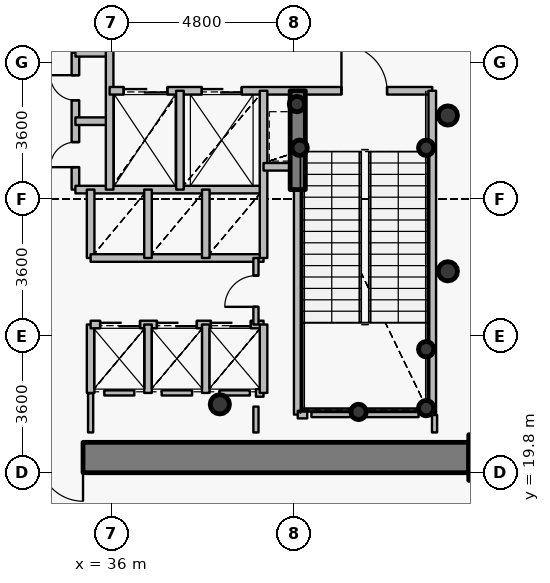
"""IFC4 building model, lengths in metres.
Left out: names, types, materials, properties, quantities, classifications, styles, units other than length and angle.
Written with IfcOpenShell. Run it as: python <this file> out.ifc"""

import sys

from ifc_helpers import new_model, si_unit, direction, frame, frame_2d, origin, origin_2d, place, context, subcontext, project, spatial, rectangle, hollow_circle, extrude, source, transform, mapped, element, fill, save


model = new_model("IFC4")
c1 = context("Model", 3, precision=1e-05, world=origin(), true_north=direction((0.0, 1.0)))
c2 = subcontext(c1, "Body", "Model", "MODEL_VIEW")
j1 = project(units=[si_unit("LENGTHUNIT", "METRE"), si_unit("PLANEANGLEUNIT", "RADIAN")], contexts=[c1])
p1 = place(None, origin())
s1 = spatial("IfcSite", under=j1, at=p1, CompositionType="ELEMENT")
p2 = place(p1, origin())
s2 = spatial("IfcBuilding", under=s1, at=p2, CompositionType="ELEMENT")
p3 = place(p2, frame((0.0, 0.0, 92.4)))
s3 = spatial("IfcBuildingStorey", under=s2, at=p3, CompositionType="ELEMENT", Elevation=92.4)
p4 = place(p3, frame((46.0, 20.2, 0.0), z_axis=(0.0, 0.0, 1.0), x_axis=(1.0, 0.0, 0.0)))
e1 = element("IfcColumn", 1, at=p4, inside=s3, PredefinedType="COLUMN", context=c2, shape_type="SweptSolid", body=[
    extrude(rectangle(XDim=1.2, YDim=1.2, at=origin_2d()), origin(), (0.0, 0.0, 1.0), 4.8),
])
p5 = place(p3, frame((38.85, 21.6, 0.0), z_axis=(0.0, 0.0, 1.0), x_axis=(1.0, 0.0, 0.0)))
e2 = element("IfcColumn", 2, at=p5, inside=s3, PredefinedType="COLUMN", context=c2, shape_type="SweptSolid", body=[
    extrude(hollow_circle(Radius=0.254, WallThickness=0.02, at=origin_2d()), origin(), (0.0, 0.0, 1.0), 4.8),
])
for number, where, z_axis, x_axis in (
    (3, (44.28, 21.5, 0.0), (0.0, 0.0, 1.0), (1.0, 0.0, 0.0)),
    (4, (44.28, 23.05, 0.0), (0.0, 0.0, 1.0), (1.0, 0.0, 0.0)),
    (5, (42.5, 21.4, 0.0), (0.0, 0.0, 1.0), (1.0, 0.0, 0.0)),
    (6, (40.95, 28.35, 0.0), (0.0, 0.0, 1.0), (1.0, 0.0, 0.0)),
    (7, (44.28, 28.35, 0.0), (0.0, 0.0, 1.0), (1.0, 0.0, 0.0)),
    (8, (40.88, 29.5, 0.0), (0.0, 0.0, 1.0), (1.0, 0.0, 0.0)),
):
    element("IfcColumn", number, at=place(p3, frame(where, z_axis=z_axis, x_axis=x_axis)), inside=s3, PredefinedType="COLUMN", context=c2, shape_type="SweptSolid", body=[
        extrude(hollow_circle(Radius=0.203, WallThickness=0.016, at=origin_2d()), origin(), (0.0, 0.0, 1.0), 4.8),
    ])
p6 = place(p3, frame((45.4, 20.2, 0.0), z_axis=(0.0, 0.0, 1.0), x_axis=(-1.0, 0.0, 0.0)))
e9 = element("IfcWall", 9, at=p6, inside=s3, PredefinedType="SHEAR", context=c2, shape_type="SweptSolid", body=[
    extrude(rectangle(XDim=18.8, YDim=0.8, at=frame_2d((9.4, 0.0))), origin(), (0.0, 0.0, 1.0), 4.0),
])
p7 = place(p6, frame((10.15, 0.0, 0.0)))
e10 = element("IfcOpeningElement", 10, at=p7, cuts=e9, PredefinedType="OPENING", context=c2, shape_type="SweptSolid", body=[
    extrude(rectangle(XDim=1.15, YDim=2.15, at=origin_2d()), frame((0.575, 0.41, 1.075), z_axis=(0.0, -1.0, 0.0), x_axis=(1.0, 0.0, 0.0)), (0.0, 0.0, 1.0), 0.82),
])
p8 = place(p3, frame((40.9, 27.25, 0.0), z_axis=(0.0, 0.0, 1.0), x_axis=(0.0, 1.0, 0.0)))
e11 = element("IfcWall", 11, at=p8, inside=s3, PredefinedType="SHEAR", context=c2, shape_type="SweptSolid", body=[
    extrude(rectangle(XDim=2.6, YDim=0.4, at=frame_2d((1.3, 0.0))), origin(), (0.0, 0.0, 1.0), 4.15),
])
for number, where, z_axis, x_axis in (
    (12, (44.85, 25.1, 0.0), (0.0, 0.0, 1.0), (1.0, 0.0, 0.0)),
    (13, (44.85, 29.2, 0.0), (0.0, 0.0, 1.0), (1.0, 0.0, 0.0)),
):
    element("IfcColumn", number, at=place(p3, frame(where, z_axis=z_axis, x_axis=x_axis)), inside=s3, PredefinedType="COLUMN", context=c2, shape_type="SweptSolid", body=[
        extrude(hollow_circle(Radius=0.254, WallThickness=0.02, at=origin_2d()), origin(), (0.0, 0.0, 1.0), 4.8),
    ])
p9 = place(p3, frame((35.05, 27.25, 0.0), z_axis=(0.0, 0.0, 1.0), x_axis=(0.0, 1.0, 0.0)))
e14 = element("IfcWall", 14, at=p9, inside=s3, PredefinedType="PARTITIONING", context=c2, shape_type="SweptSolid", body=[
    extrude(rectangle(XDim=3.6, YDim=0.2, at=frame_2d((1.8, 0.0))), origin(), (0.0, 0.0, 1.0), 4.55),
])
p10 = place(p9, frame((0.59, 0.0, 0.0)))
e15 = element("IfcOpeningElement", 15, at=p10, cuts=e14, PredefinedType="OPENING", context=c2, shape_type="SweptSolid", body=[
    extrude(rectangle(XDim=0.66, YDim=2.05, at=origin_2d()), frame((0.33, 0.11, 1.025), z_axis=(0.0, -1.0, 0.0), x_axis=(1.0, 0.0, 0.0)), (0.0, 0.0, 1.0), 0.22),
])
p11 = place(p9, frame((2.35, 0.0, 0.0)))
e16 = element("IfcOpeningElement", 16, at=p11, cuts=e14, PredefinedType="OPENING", context=c2, shape_type="SweptSolid", body=[
    extrude(rectangle(XDim=0.66, YDim=2.05, at=origin_2d()), frame((0.33, 0.11, 1.025), z_axis=(0.0, -1.0, 0.0), x_axis=(1.0, 0.0, 0.0)), (0.0, 0.0, 1.0), 0.22),
])
p12 = place(p3, frame((35.05, 27.25, 0.0), z_axis=(0.0, 0.0, 1.0), x_axis=(1.0, 0.0, 0.0)))
e17 = element("IfcWall", 17, at=p12, inside=s3, PredefinedType="PARTITIONING", context=c2, shape_type="SweptSolid", body=[
    extrude(rectangle(XDim=4.95, YDim=0.2, at=frame_2d((2.475, 0.0))), origin(), (0.0, 0.0, 1.0), 4.135),
])
for number, where, z_axis, x_axis in (
    (18, (35.05, 29.05, 0.0), (0.0, 0.0, 1.0), (1.0, 0.0, 0.0)),
    (19, (35.05, 30.85, 0.0), (0.0, 0.0, 1.0), (1.0, 0.0, 0.0)),
):
    element("IfcWall", number, at=place(p3, frame(where, z_axis=z_axis, x_axis=x_axis)), inside=s3, PredefinedType="PARTITIONING", context=c2, shape_type="SweptSolid", body=[
        extrude(rectangle(XDim=0.9, YDim=0.2, at=frame_2d((0.45, 0.0))), origin(), (0.0, 0.0, 1.0), 4.55),
    ])
p13 = place(p3, frame((35.45, 21.9, 0.0), z_axis=(0.0, 0.0, 1.0), x_axis=(0.0, 1.0, 0.0)))
e20 = element("IfcWall", 20, at=p13, inside=s3, PredefinedType="PARTITIONING", context=c2, shape_type="SweptSolid", body=[
    extrude(rectangle(XDim=1.8, YDim=0.2, at=frame_2d((0.9, 0.0))), origin(), (0.0, 0.0, 1.0), 4.55),
])
p14 = place(p3, frame((35.45, 23.7, 0.0), z_axis=(0.0, 0.0, 1.0), x_axis=(1.0, 0.0, 0.0)))
e21 = element("IfcWall", 21, at=p14, inside=s3, PredefinedType="PARTITIONING", context=c2, shape_type="SweptSolid", body=[
    extrude(rectangle(XDim=4.55, YDim=0.2, at=frame_2d((2.275, 0.0))), origin(), (0.0, 0.0, 1.0), 4.135),
])
p15 = place(p14, frame((0.25, 0.0, 0.0)))
e22 = element("IfcOpeningElement", 22, at=p15, cuts=e21, PredefinedType="OPENING", context=c2, shape_type="SweptSolid", body=[
    extrude(rectangle(XDim=1.05, YDim=2.15, at=origin_2d()), frame((0.525, 0.11, 1.075), z_axis=(0.0, -1.0, 0.0), x_axis=(1.0, 0.0, 0.0)), (0.0, 0.0, 1.0), 0.22),
])
p16 = place(p14, frame((1.745, 0.0, 0.0)))
e23 = element("IfcOpeningElement", 23, at=p16, cuts=e21, PredefinedType="OPENING", context=c2, shape_type="SweptSolid", body=[
    extrude(rectangle(XDim=1.05, YDim=2.15, at=origin_2d()), frame((0.525, 0.11, 1.075), z_axis=(0.0, -1.0, 0.0), x_axis=(1.0, 0.0, 0.0)), (0.0, 0.0, 1.0), 0.22),
])
p17 = place(p14, frame((3.165, 0.0, 0.0)))
e24 = element("IfcOpeningElement", 24, at=p17, cuts=e21, PredefinedType="OPENING", context=c2, shape_type="SweptSolid", body=[
    extrude(rectangle(XDim=1.05, YDim=2.15, at=origin_2d()), frame((0.525, 0.11, 1.075), z_axis=(0.0, -1.0, 0.0), x_axis=(1.0, 0.0, 0.0)), (0.0, 0.0, 1.0), 0.22),
])
p18 = place(p3, frame((35.45, 25.45, 0.0), z_axis=(0.0, 0.0, 1.0), x_axis=(0.0, 1.0, 0.0)))
e25 = element("IfcWall", 25, at=p18, inside=s3, PredefinedType="PARTITIONING", context=c2, shape_type="SweptSolid", body=[
    extrude(rectangle(XDim=1.8, YDim=0.2, at=frame_2d((0.9, 0.0))), origin(), (0.0, 0.0, 1.0), 4.55),
])
p19 = place(p3, frame((35.45, 25.45, 0.0), z_axis=(0.0, 0.0, 1.0), x_axis=(1.0, 0.0, 0.0)))
e26 = element("IfcWall", 26, at=p19, inside=s3, PredefinedType="PARTITIONING", context=c2, shape_type="SweptSolid", body=[
    extrude(rectangle(XDim=4.55, YDim=0.2, at=frame_2d((2.275, 0.0))), origin(), (0.0, 0.0, 1.0), 4.135),
])
p20 = place(p3, frame((35.95, 27.25, 0.0), z_axis=(0.0, 0.0, 1.0), x_axis=(0.0, 1.0, 0.0)))
e27 = element("IfcWall", 27, at=p20, inside=s3, PredefinedType="PARTITIONING", context=c2, shape_type="SweptSolid", body=[
    extrude(rectangle(XDim=3.8, YDim=0.2, at=frame_2d((1.9, 0.0))), origin(), (0.0, 0.0, 1.0), 4.55),
])
p21 = place(p3, frame((35.95, 29.85, 0.0), z_axis=(0.0, 0.0, 1.0), x_axis=(1.0, 0.0, 0.0)))
e28 = element("IfcWall", 28, at=p21, inside=s3, PredefinedType="PARTITIONING", context=c2, shape_type="SweptSolid", body=[
    extrude(rectangle(XDim=8.49, YDim=0.2, at=frame_2d((4.245, 0.0))), origin(), (0.0, 0.0, 1.0), 4.135),
])
p22 = place(p21, frame((6.1, 0.0, 0.0)))
e29 = element("IfcOpeningElement", 29, at=p22, cuts=e28, PredefinedType="OPENING", context=c2, shape_type="SweptSolid", body=[
    extrude(rectangle(XDim=1.2, YDim=2.15, at=origin_2d()), frame((0.6, 0.11, 1.075), z_axis=(0.0, -1.0, 0.0), x_axis=(1.0, 0.0, 0.0)), (0.0, 0.0, 1.0), 0.22),
])
p23 = place(p21, frame((0.37, 0.0, 0.0)))
e30 = element("IfcOpeningElement", 30, at=p23, cuts=e28, PredefinedType="OPENING", context=c2, shape_type="SweptSolid", body=[
    extrude(rectangle(XDim=1.15, YDim=2.15, at=origin_2d()), frame((0.575, 0.11, 1.075), z_axis=(0.0, -1.0, 0.0), x_axis=(1.0, 0.0, 0.0)), (0.0, 0.0, 1.0), 0.22),
])
p24 = place(p21, frame((2.425, 0.0, 0.0)))
e31 = element("IfcOpeningElement", 31, at=p24, cuts=e28, PredefinedType="OPENING", context=c2, shape_type="SweptSolid", body=[
    extrude(rectangle(XDim=1.05, YDim=2.15, at=origin_2d()), frame((0.525, 0.11, 1.075), z_axis=(0.0, -1.0, 0.0), x_axis=(1.0, 0.0, 0.0)), (0.0, 0.0, 1.0), 0.22),
])
for number, where, z_axis, x_axis in (
    (32, (36.96, 21.9, 0.0), (0.0, 0.0, 1.0), (0.0, 1.0, 0.0)),
    (33, (36.96, 25.45, 0.0), (0.0, 0.0, 1.0), (0.0, 1.0, 0.0)),
):
    element("IfcWall", number, at=place(p3, frame(where, z_axis=z_axis, x_axis=x_axis)), inside=s3, PredefinedType="PARTITIONING", context=c2, shape_type="SweptSolid", body=[
        extrude(rectangle(XDim=1.8, YDim=0.2, at=frame_2d((0.9, 0.0))), origin(), (0.0, 0.0, 1.0), 4.55),
    ])
p25 = place(p3, frame((37.8, 27.25, 0.0), z_axis=(0.0, 0.0, 1.0), x_axis=(0.0, 1.0, 0.0)))
e34 = element("IfcWall", 34, at=p25, inside=s3, PredefinedType="PARTITIONING", context=c2, shape_type="SweptSolid", body=[
    extrude(rectangle(XDim=2.6, YDim=0.2, at=frame_2d((1.3, 0.0))), origin(), (0.0, 0.0, 1.0), 4.55),
])
for number, where, z_axis, x_axis in (
    (35, (38.48, 21.9, 0.0), (0.0, 0.0, 1.0), (0.0, 1.0, 0.0)),
    (36, (38.48, 25.45, 0.0), (0.0, 0.0, 1.0), (0.0, 1.0, 0.0)),
):
    element("IfcWall", number, at=place(p3, frame(where, z_axis=z_axis, x_axis=x_axis)), inside=s3, PredefinedType="PARTITIONING", context=c2, shape_type="SweptSolid", body=[
        extrude(rectangle(XDim=1.8, YDim=0.2, at=frame_2d((0.9, 0.0))), origin(), (0.0, 0.0, 1.0), 4.55),
    ])
p26 = place(p3, frame((39.8, 21.9, 0.0), z_axis=(0.0, 0.0, 1.0), x_axis=(1.0, 0.0, 0.0)))
e37 = element("IfcWall", 37, at=p26, inside=s3, PredefinedType="PARTITIONING", context=c2, shape_type="SweptSolid", body=[
    extrude(rectangle(XDim=0.2, YDim=0.2, at=frame_2d((0.1, 0.0))), origin(), (0.0, 0.0, 1.0), 4.55),
])
p27 = place(p3, frame((39.8, 23.7, 0.0), z_axis=(0.0, 0.0, 1.0), x_axis=(0.0, 1.0, 0.0)))
e38 = element("IfcWall", 38, at=p27, inside=s3, PredefinedType="PARTITIONING", context=c2, shape_type="SweptSolid", body=[
    extrude(rectangle(XDim=1.75, YDim=0.135, at=frame_2d((0.875, 0.0))), origin(), (0.0, 0.0, 1.0), 4.55),
])
p28 = place(p27, frame((0.465, 0.0, 0.0)))
e39 = element("IfcOpeningElement", 39, at=p28, cuts=e38, PredefinedType="OPENING", context=c2, shape_type="SweptSolid", body=[
    extrude(rectangle(XDim=0.82, YDim=2.1, at=origin_2d()), frame((0.41, 0.078, 1.05), z_axis=(0.0, -1.0, 0.0), x_axis=(1.0, 0.0, 0.0)), (0.0, 0.0, 1.0), 0.155),
])
p29 = place(p3, frame((40.0, 21.9, 0.0), z_axis=(0.0, 0.0, 1.0), x_axis=(0.0, 1.0, 0.0)))
e40 = element("IfcWall", 40, at=p29, inside=s3, PredefinedType="PARTITIONING", context=c2, shape_type="SweptSolid", body=[
    extrude(rectangle(XDim=1.8, YDim=0.2, at=frame_2d((0.9, 0.0))), origin(), (0.0, 0.0, 1.0), 4.55),
])
p30 = place(p3, frame((40.0, 25.45, 0.0), z_axis=(0.0, 0.0, 1.0), x_axis=(0.0, 1.0, 0.0)))
e41 = element("IfcWall", 41, at=p30, inside=s3, PredefinedType="PARTITIONING", context=c2, shape_type="SweptSolid", body=[
    extrude(rectangle(XDim=4.4, YDim=0.2, at=frame_2d((2.2, 0.0))), origin(), (0.0, 0.0, 1.0), 4.55),
])
p31 = place(p3, frame((40.0, 27.85, 0.0), z_axis=(0.0, 0.0, 1.0), x_axis=(1.0, 0.0, 0.0)))
e42 = element("IfcWall", 42, at=p31, inside=s3, PredefinedType="PARTITIONING", context=c2, shape_type="SweptSolid", body=[
    extrude(rectangle(XDim=0.9, YDim=0.2, at=frame_2d((0.45, 0.0))), origin(), (0.0, 0.0, 1.0), 4.55),
])
p32 = place(p3, frame((40.9, 21.33, 0.0), z_axis=(0.0, 0.0, 1.0), x_axis=(0.0, 1.0, 0.0)))
e43 = element("IfcWall", 43, at=p32, inside=s3, PredefinedType="PARTITIONING", context=c2, shape_type="SweptSolid", body=[
    extrude(rectangle(XDim=5.91, YDim=0.2, at=frame_2d((2.955, 0.0))), origin(), (0.0, 0.0, 1.0), 4.085),
])
p33 = place(p3, frame((40.9, 21.33, 0.0), z_axis=(0.0, 0.0, 1.0), x_axis=(1.0, 0.0, 0.0)))
e44 = element("IfcWall", 44, at=p33, inside=s3, PredefinedType="PARTITIONING", context=c2, shape_type="SweptSolid", body=[
    extrude(rectangle(XDim=0.25, YDim=0.2, at=frame_2d((0.125, 0.0))), origin(), (0.0, 0.0, 1.0), 4.085),
])
p34 = place(p3, frame((44.44, 21.33, 0.0), z_axis=(0.0, 0.0, 1.0), x_axis=(0.0, 1.0, 0.0)))
e45 = element("IfcWall", 45, at=p34, inside=s3, PredefinedType="PARTITIONING", context=c2, shape_type="SweptSolid", body=[
    extrude(rectangle(XDim=8.52, YDim=0.2, at=frame_2d((4.26, 0.0))), origin(), (0.0, 0.0, 1.0), 4.55),
])
p35 = place(p3, frame((44.08, 21.33, 0.0), z_axis=(0.0, 0.0, 1.0), x_axis=(-1.0, 0.0, 0.0)))
e46 = element("IfcWall", 46, at=p35, inside=s3, PredefinedType="PARTITIONING", context=c2, shape_type="SweptSolid", body=[
    extrude(rectangle(XDim=2.82, YDim=0.135, at=frame_2d((1.41, 0.0))), origin(), (0.0, 0.0, 1.0), 4.085),
])
p36 = place(p3, frame((36.6, 21.9, 0.0), z_axis=(0.0, 0.0, 1.0), x_axis=(-1.0, 0.0, 0.0)))
e47 = element("IfcWall", 47, at=p36, inside=s3, PredefinedType="PARTITIONING", context=c2, shape_type="SweptSolid", body=[
    extrude(rectangle(XDim=0.79, YDim=0.135, at=frame_2d((0.395, 0.0))), origin(), (0.0, 0.0, 1.0), 4.55),
])
p37 = place(p3, frame((38.12, 21.9, 0.0), z_axis=(0.0, 0.0, 1.0), x_axis=(-1.0, 0.0, 0.0)))
e48 = element("IfcWall", 48, at=p37, inside=s3, PredefinedType="PARTITIONING", context=c2, shape_type="SweptSolid", body=[
    extrude(rectangle(XDim=0.8, YDim=0.135, at=frame_2d((0.4, 0.0))), origin(), (0.0, 0.0, 1.0), 4.55),
])
p38 = place(p3, frame((39.64, 21.9, 0.0), z_axis=(0.0, 0.0, 1.0), x_axis=(-1.0, 0.0, 0.0)))
e49 = element("IfcWall", 49, at=p38, inside=s3, PredefinedType="PARTITIONING", context=c2, shape_type="SweptSolid", body=[
    extrude(rectangle(XDim=0.8, YDim=0.135, at=frame_2d((0.4, 0.0))), origin(), (0.0, 0.0, 1.0), 4.135),
])
p39 = place(p3, frame((39.8, 20.86, 0.0), z_axis=(0.0, 0.0, 1.0), x_axis=(0.0, 1.0, 0.0)))
e50 = element("IfcWall", 50, at=p39, inside=s3, PredefinedType="PARTITIONING", context=c2, shape_type="SweptSolid", body=[
    extrude(rectangle(XDim=0.68, YDim=0.135, at=frame_2d((0.34, 0.0))), origin(), (0.0, 0.0, 1.0), 4.085),
])
p40 = place(p3, frame((44.5, 20.86, 0.0), z_axis=(0.0, 0.0, 1.0), x_axis=(0.0, 1.0, 0.0)))
e51 = element("IfcWall", 51, at=p40, inside=s3, PredefinedType="PARTITIONING", context=c2, shape_type="SweptSolid", body=[
    extrude(rectangle(XDim=0.46, YDim=0.135, at=frame_2d((0.23, 0.0))), origin(), (0.0, 0.0, 1.0), 4.55),
])
p41 = place(p3, frame((35.45, 21.89, 0.0), z_axis=(0.0, 0.0, 1.0), x_axis=(0.0, -1.0, 0.0)))
e52 = element("IfcWall", 52, at=p41, inside=s3, PredefinedType="PARTITIONING", context=c2, shape_type="SweptSolid", body=[
    extrude(rectangle(XDim=1.03, YDim=0.135, at=frame_2d((0.515, 0.0))), origin(), (0.0, 0.0, 1.0), 4.135),
])
p42 = place(p3, frame((45.41, 19.8, 0.0), z_axis=(0.0, 0.0, 1.0), x_axis=(1.0, 0.0, 0.0)))
e53 = element("IfcWall", 53, at=p42, inside=s3, PredefinedType="PARTITIONING", context=c2, shape_type="SweptSolid", body=[
    extrude(rectangle(XDim=0.99, YDim=0.135, at=frame_2d((0.495, 0.0))), origin(), (0.0, 0.0, 1.0), 3.985),
])
m1 = source(origin(), c2, "Body", "SweptSolid", [
    extrude(rectangle(XDim=1.15, YDim=2.15, at=origin_2d()), frame((0.575, 0.025, 1.075), z_axis=(0.0, -1.0, 0.0), x_axis=(1.0, 0.0, 0.0)), (0.0, 0.0, 1.0), 0.05),
])
p43 = place(p7, origin())
e54 = element("IfcDoor", 54, at=p43, inside=s3, OperationType="SINGLE_SWING_LEFT", PredefinedType="DOOR", context=c2, shape_type="MappedRepresentation", body=[
    mapped(m1, transform((0.0, 0.0, 0.0), x_axis=(1.0, 0.0, 0.0), y_axis=(0.0, 1.0, 0.0), z_axis=(0.0, 0.0, 1.0), scale=1.0)),
])
fill(e10, e54)
m2 = source(origin(), c2, "Body", "SweptSolid", [
    extrude(rectangle(XDim=1.2, YDim=2.15, at=origin_2d()), frame((0.6, 0.025, 1.075), z_axis=(0.0, -1.0, 0.0), x_axis=(1.0, 0.0, 0.0)), (0.0, 0.0, 1.0), 0.05),
])
p44 = place(p22, origin())
e55 = element("IfcDoor", 55, at=p44, inside=s3, OperationType="SINGLE_SWING_LEFT", PredefinedType="DOOR", context=c2, shape_type="MappedRepresentation", body=[
    mapped(m2, transform((0.0, 0.0, 0.0), x_axis=(1.0, 0.0, 0.0), y_axis=(0.0, 1.0, 0.0), z_axis=(0.0, 0.0, 1.0), scale=1.0)),
])
fill(e29, e55)
m3 = source(origin(), c2, "Body", "SweptSolid", [
    extrude(rectangle(XDim=1.15, YDim=2.15, at=origin_2d()), frame((0.575, 0.025, 1.075), z_axis=(0.0, -1.0, 0.0), x_axis=(1.0, 0.0, 0.0)), (0.0, 0.0, 1.0), 0.05),
])
p45 = place(p23, origin())
e56 = element("IfcDoor", 56, at=p45, inside=s3, OperationType="DOUBLE_DOOR_SLIDING", PredefinedType="USERDEFINED", context=c2, shape_type="MappedRepresentation", body=[
    mapped(m3, transform((0.0, 0.0, 0.0), x_axis=(1.0, 0.0, 0.0), y_axis=(0.0, 1.0, 0.0), z_axis=(0.0, 0.0, 1.0), scale=1.0)),
])
fill(e30, e56)
m4 = source(origin(), c2, "Body", "SweptSolid", [
    extrude(rectangle(XDim=1.05, YDim=2.15, at=origin_2d()), frame((0.525, 0.025, 1.075), z_axis=(0.0, -1.0, 0.0), x_axis=(1.0, 0.0, 0.0)), (0.0, 0.0, 1.0), 0.05),
])
p46 = place(p24, origin())
e57 = element("IfcDoor", 57, at=p46, inside=s3, OperationType="DOUBLE_DOOR_SLIDING", PredefinedType="USERDEFINED", context=c2, shape_type="MappedRepresentation", body=[
    mapped(m4, transform((0.0, 0.0, 0.0), x_axis=(1.0, 0.0, 0.0), y_axis=(0.0, 1.0, 0.0), z_axis=(0.0, 0.0, 1.0), scale=1.0)),
])
fill(e31, e57)
p47 = place(p15, origin())
e58 = element("IfcDoor", 58, at=p47, inside=s3, OperationType="DOUBLE_DOOR_SLIDING", PredefinedType="USERDEFINED", context=c2, shape_type="MappedRepresentation", body=[
    mapped(m4, transform((0.0, 0.0, 0.0), x_axis=(1.0, 0.0, 0.0), y_axis=(0.0, 1.0, 0.0), z_axis=(0.0, 0.0, 1.0), scale=1.0)),
])
fill(e22, e58)
p48 = place(p16, origin())
e59 = element("IfcDoor", 59, at=p48, inside=s3, OperationType="DOUBLE_DOOR_SLIDING", PredefinedType="USERDEFINED", context=c2, shape_type="MappedRepresentation", body=[
    mapped(m4, transform((0.0, 0.0, 0.0), x_axis=(1.0, 0.0, 0.0), y_axis=(0.0, 1.0, 0.0), z_axis=(0.0, 0.0, 1.0), scale=1.0)),
])
fill(e23, e59)
p49 = place(p17, origin())
e60 = element("IfcDoor", 60, at=p49, inside=s3, OperationType="DOUBLE_DOOR_SLIDING", PredefinedType="USERDEFINED", context=c2, shape_type="MappedRepresentation", body=[
    mapped(m4, transform((0.0, 0.0, 0.0), x_axis=(1.0, 0.0, 0.0), y_axis=(0.0, 1.0, 0.0), z_axis=(0.0, 0.0, 1.0), scale=1.0)),
])
fill(e24, e60)
m5 = source(origin(), c2, "Body", "SweptSolid", [
    extrude(rectangle(XDim=0.66, YDim=2.05, at=origin_2d()), frame((0.33, 0.025, 1.025), z_axis=(0.0, -1.0, 0.0), x_axis=(1.0, 0.0, 0.0)), (0.0, 0.0, 1.0), 0.05),
])
p50 = place(p10, origin())
e61 = element("IfcDoor", 61, at=p50, inside=s3, OperationType="SINGLE_SWING_LEFT", PredefinedType="USERDEFINED", context=c2, shape_type="MappedRepresentation", body=[
    mapped(m5, transform((0.0, 0.0, 0.0), x_axis=(1.0, 0.0, 0.0), y_axis=(0.0, 1.0, 0.0), z_axis=(0.0, 0.0, 1.0), scale=1.0)),
])
fill(e15, e61)
p51 = place(p11, origin())
e62 = element("IfcDoor", 62, at=p51, inside=s3, OperationType="SINGLE_SWING_RIGHT", PredefinedType="USERDEFINED", context=c2, shape_type="MappedRepresentation", body=[
    mapped(m5, transform((0.0, 0.0, 0.0), x_axis=(1.0, 0.0, 0.0), y_axis=(0.0, 1.0, 0.0), z_axis=(0.0, 0.0, 1.0), scale=1.0)),
])
fill(e16, e62)
m6 = source(origin(), c2, "Body", "SweptSolid", [
    extrude(rectangle(XDim=0.82, YDim=2.1, at=origin_2d()), frame((0.41, 0.025, 1.05), z_axis=(0.0, -1.0, 0.0), x_axis=(1.0, 0.0, 0.0)), (0.0, 0.0, 1.0), 0.05),
])
p52 = place(p28, origin())
e63 = element("IfcDoor", 63, at=p52, inside=s3, OperationType="SINGLE_SWING_LEFT", PredefinedType="DOOR", context=c2, shape_type="MappedRepresentation", body=[
    mapped(m6, transform((0.0, 0.0, 0.0), x_axis=(1.0, 0.0, 0.0), y_axis=(0.0, 1.0, 0.0), z_axis=(0.0, 0.0, 1.0), scale=1.0)),
])
fill(e39, e63)
save(model, sys.argv[1])
